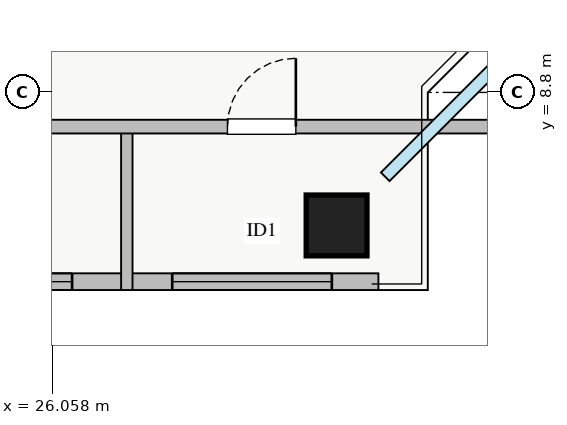
"""IFC4 building model, lengths in metres.
Left out: names, types, materials, properties, quantities, classifications, styles, units other than length and angle.
Written with IfcOpenShell. Run it as: python <this file> out.ifc"""

import sys

from ifc_helpers import new_model, si_unit, direction, frame, frame_2d, origin, origin_2d, place, context, subcontext, project, spatial, rectangle, extrude, source, transform, mapped, element, fill, save


model = new_model("IFC4")
c1 = context("Model", 3, precision=1e-05, world=origin(), true_north=direction((0.0, 1.0)))
c2 = subcontext(c1, "Body", "Model", "MODEL_VIEW")
j1 = project(units=[si_unit("LENGTHUNIT", "METRE"), si_unit("PLANEANGLEUNIT", "RADIAN")], contexts=[c1])
p1 = place(None, origin())
s1 = spatial("IfcSite", under=j1, at=p1, CompositionType="ELEMENT")
p2 = place(p1, origin())
s2 = spatial("IfcBuilding", under=s1, at=p2, CompositionType="ELEMENT")
p3 = place(p2, frame((0.0, 0.0, 226.25)))
s3 = spatial("IfcBuildingStorey", under=s2, at=p3, CompositionType="ELEMENT", Elevation=226.25)
m1 = source(origin(), c2, "Body", "SweptSolid", [
    extrude(rectangle(XDim=0.8, YDim=0.8, at=origin_2d()), origin(), (0.0, 0.0, 1.0), 3.25),
])
p4 = place(p3, frame((29.8, 7.05, 0.0), z_axis=(0.0, 0.0, 1.0), x_axis=(1.0, 0.0, 0.0)))
e1 = element("IfcColumn", 1, at=p4, inside=s3, PredefinedType="COLUMN", context=c2, shape_type="MappedRepresentation", body=[
    mapped(m1, transform((0.0, 0.0, 0.0), x_axis=(1.0, 0.0, 0.0), y_axis=(0.0, 1.0, 0.0), z_axis=(0.0, 0.0, 1.0), scale=1.0)),
])
p5 = place(p3, frame((7.65, 6.31, 0.0), z_axis=(0.0, 0.0, 1.0), x_axis=(1.0, 0.0, 0.0)))
e2 = element("IfcWall", 2, at=p5, inside=s3, PredefinedType="STANDARD", context=c2, shape_type="SweptSolid", body=[
    extrude(rectangle(XDim=22.7, YDim=0.22, at=frame_2d((11.35, 0.0))), origin(), (0.0, 0.0, 1.0), 2.61),
])
p6 = place(p5, frame((12.2, 0.0, 0.0)))
e3 = element("IfcOpeningElement", 3, at=p6, cuts=e2, PredefinedType="OPENING", context=c2, shape_type="SweptSolid", body=[
    extrude(rectangle(XDim=1.2, YDim=2.1, at=frame_2d((0.6, 1.05))), frame((0.0, 0.12, 0.0), z_axis=(0.0, -1.0, 0.0), x_axis=(1.0, 0.0, 0.0)), (0.0, 0.0, 1.0), 0.24),
])
p7 = place(p5, frame((1.637, 0.0, 0.9)))
e4 = element("IfcOpeningElement", 4, at=p7, cuts=e2, PredefinedType="OPENING", context=c2, shape_type="SweptSolid", body=[
    extrude(rectangle(XDim=2.4, YDim=1.48, at=frame_2d((1.2, 0.74))), frame((0.0, 0.12, 0.0), z_axis=(0.0, -1.0, 0.0), x_axis=(1.0, 0.0, 0.0)), (0.0, 0.0, 1.0), 0.24),
])
p8 = place(p5, frame((7.612, 0.0, 0.9)))
e5 = element("IfcOpeningElement", 5, at=p8, cuts=e2, PredefinedType="OPENING", context=c2, shape_type="SweptSolid", body=[
    extrude(rectangle(XDim=1.8, YDim=1.45, at=frame_2d((0.9, 0.725))), frame((0.0, 0.12, 0.0), z_axis=(0.0, -1.0, 0.0), x_axis=(1.0, 0.0, 0.0)), (0.0, 0.0, 1.0), 0.24),
])
p9 = place(p5, frame((19.988, 0.0, 0.9)))
e6 = element("IfcOpeningElement", 6, at=p9, cuts=e2, PredefinedType="OPENING", context=c2, shape_type="SweptSolid", body=[
    extrude(rectangle(XDim=2.1, YDim=1.5, at=frame_2d((1.05, 0.75))), frame((0.0, 0.12, 0.0), z_axis=(0.0, -1.0, 0.0), x_axis=(1.0, 0.0, 0.0)), (0.0, 0.0, 1.0), 0.24),
])
p10 = place(p5, frame((16.27, 0.0, 0.9)))
e7 = element("IfcOpeningElement", 7, at=p10, cuts=e2, PredefinedType="OPENING", context=c2, shape_type="SweptSolid", body=[
    extrude(rectangle(XDim=2.4, YDim=1.5, at=frame_2d((1.2, 0.75))), frame((0.0, 0.12, 0.0), z_axis=(0.0, -1.0, 0.0), x_axis=(1.0, 0.0, 0.0)), (0.0, 0.0, 1.0), 0.24),
])
p11 = place(p3, frame((27.04, 6.2, 0.0), z_axis=(0.0, 0.0, 1.0), x_axis=(0.0, 1.0, 0.0)))
e8 = element("IfcWall", 8, at=p11, inside=s3, PredefinedType="PARTITIONING", context=c2, shape_type="SweptSolid", body=[
    extrude(rectangle(XDim=2.15, YDim=0.15, at=frame_2d((1.075, 0.0))), origin(), (0.0, 0.0, 1.0), 3.07),
])
p12 = place(p3, frame((23.2, 8.35, 0.0), z_axis=(0.0, 0.0, 1.0), x_axis=(1.0, 0.0, 0.0)))
e9 = element("IfcWall", 9, at=p12, inside=s3, PredefinedType="PARTITIONING", context=c2, shape_type="SweptSolid", body=[
    extrude(rectangle(XDim=9.25, YDim=0.18, at=frame_2d((4.625, 0.0))), origin(), (0.0, 0.0, 1.0), 3.07),
])
p13 = place(p12, frame((1.47, 0.0, 0.0)))
e10 = element("IfcOpeningElement", 10, at=p13, cuts=e9, PredefinedType="OPENING", context=c2, shape_type="SweptSolid", body=[
    extrude(rectangle(XDim=0.9, YDim=2.05, at=frame_2d((0.45, 1.025))), frame((0.0, 0.1, 0.0), z_axis=(0.0, -1.0, 0.0), x_axis=(1.0, 0.0, 0.0)), (0.0, 0.0, 1.0), 0.2),
])
p14 = place(p12, frame((5.164, 0.0, 0.0)))
e11 = element("IfcOpeningElement", 11, at=p14, cuts=e9, PredefinedType="OPENING", context=c2, shape_type="SweptSolid", body=[
    extrude(rectangle(XDim=0.9, YDim=2.05, at=frame_2d((0.45, 1.025))), frame((0.0, 0.1, 0.0), z_axis=(0.0, -1.0, 0.0), x_axis=(1.0, 0.0, 0.0)), (0.0, 0.0, 1.0), 0.2),
])
m2 = source(origin(), c2, "Body", "SweptSolid", [
    extrude(rectangle(XDim=2.1, YDim=1.5, at=frame_2d((1.05, 0.75))), frame((0.0, 0.03, 0.0), z_axis=(0.0, -1.0, 0.0), x_axis=(1.0, 0.0, 0.0)), (0.0, 0.0, 1.0), 0.06),
])
p15 = place(p9, origin())
e12 = element("IfcWindow", 12, at=p15, inside=s3, PartitioningType="TRIPLE_PANEL_VERTICAL", PredefinedType="WINDOW", context=c2, shape_type="MappedRepresentation", body=[
    mapped(m2, transform((0.0, 0.0, 0.0), x_axis=(1.0, 0.0, 0.0), y_axis=(0.0, 1.0, 0.0), z_axis=(0.0, 0.0, 1.0), scale=1.0)),
])
fill(e6, e12)
m3 = source(origin(), c2, "Body", "SweptSolid", [
    extrude(rectangle(XDim=0.9, YDim=2.05, at=frame_2d((0.45, 1.025))), frame((0.0, 0.025, 0.0), z_axis=(0.0, -1.0, 0.0), x_axis=(1.0, 0.0, 0.0)), (0.0, 0.0, 1.0), 0.05),
])
p16 = place(p14, origin())
e13 = element("IfcDoor", 13, at=p16, inside=s3, OperationType="SINGLE_SWING_RIGHT", PredefinedType="DOOR", context=c2, shape_type="MappedRepresentation", body=[
    mapped(m3, transform((0.0, 0.0, 0.0), x_axis=(1.0, 0.0, 0.0), y_axis=(0.0, 1.0, 0.0), z_axis=(0.0, 0.0, 1.0), scale=1.0)),
])
fill(e11, e13)
m4 = source(origin(), c2, "Body", "SweptSolid", [
    extrude(rectangle(XDim=2.4, YDim=1.5, at=frame_2d((1.2, 0.75))), frame((0.0, 0.03, 0.0), z_axis=(0.0, -1.0, 0.0), x_axis=(1.0, 0.0, 0.0)), (0.0, 0.0, 1.0), 0.06),
])
p17 = place(p10, origin())
e14 = element("IfcWindow", 14, at=p17, inside=s3, PartitioningType="TRIPLE_PANEL_VERTICAL", PredefinedType="WINDOW", context=c2, shape_type="MappedRepresentation", body=[
    mapped(m4, transform((0.0, 0.0, 0.0), x_axis=(1.0, 0.0, 0.0), y_axis=(0.0, 1.0, 0.0), z_axis=(0.0, 0.0, 1.0), scale=1.0)),
])
fill(e7, e14)
save(model, sys.argv[1])
